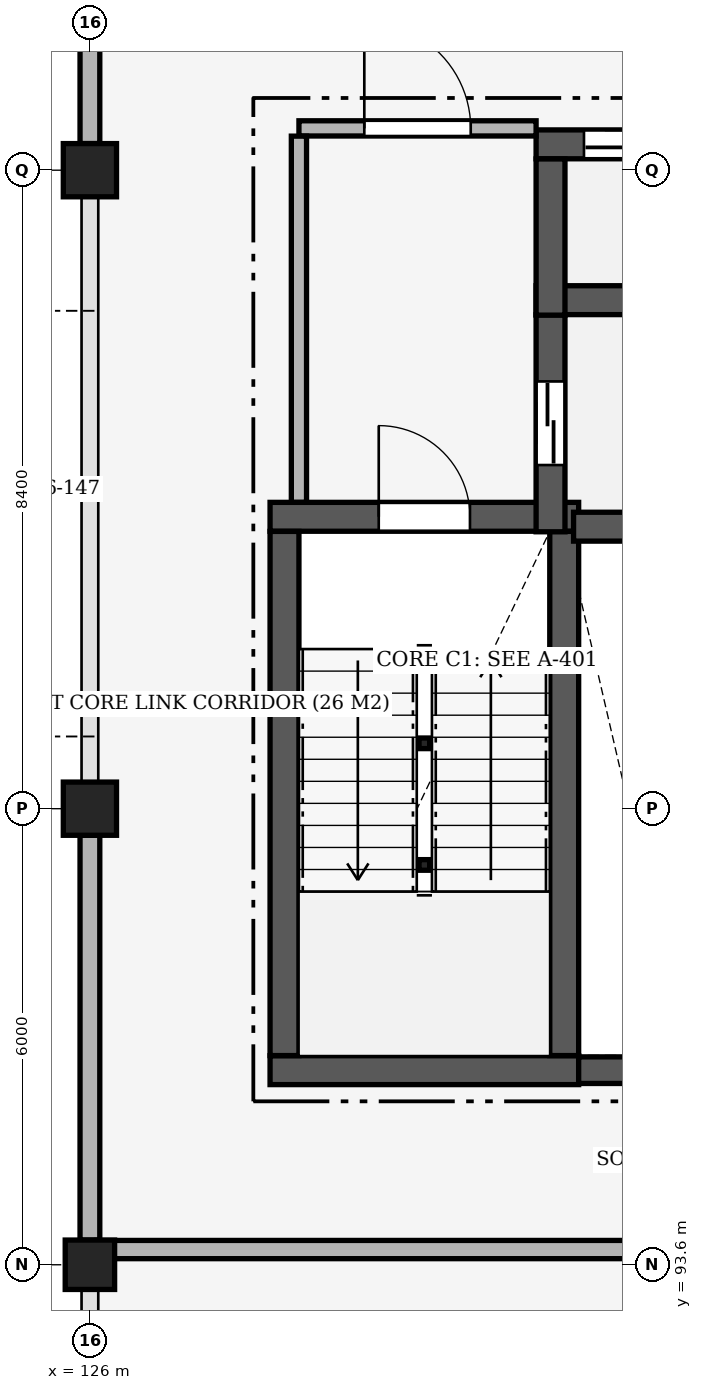
"""IFC4 building model, lengths in metres.
Left out: names, types, materials, properties, quantities, classifications, styles, units other than length and angle.
Written with IfcOpenShell. Run it as: python <this file> out.ifc"""

import sys

from ifc_helpers import new_model, si_unit, direction, frame, frame_2d, origin, origin_2d, place, context, subcontext, project, spatial, rectangle, hollow_circle, extrude, element, fill, save


model = new_model("IFC4")
c1 = context("Model", 3, precision=1e-05, world=origin(), true_north=direction((0.0, 1.0)))
c2 = subcontext(c1, "Body", "Model", "MODEL_VIEW")
j1 = project(units=[si_unit("LENGTHUNIT", "METRE"), si_unit("PLANEANGLEUNIT", "RADIAN")], contexts=[c1])
p1 = place(None, origin())
s1 = spatial("IfcSite", under=j1, at=p1, CompositionType="ELEMENT")
p2 = place(p1, origin())
s2 = spatial("IfcBuilding", under=s1, at=p2, CompositionType="ELEMENT")
p3 = place(p2, frame((0.0, 0.0, 29.4)))
s3 = spatial("IfcBuildingStorey", under=s2, at=p3, CompositionType="ELEMENT", Elevation=29.4)
p4 = place(p3, frame((126.0, 93.6, 0.0), z_axis=(0.0, 0.0, 1.0), x_axis=(1.0, 0.0, 0.0)))
e1 = element("IfcColumn", 1, at=p4, inside=s3, PredefinedType="COLUMN", context=c2, shape_type="SweptSolid", body=[
    extrude(rectangle(XDim=0.65, YDim=0.65, at=origin_2d()), origin(), (0.0, 0.0, 1.0), 4.2),
])
for number, where, z_axis, x_axis in (
    (2, (126.0, 99.6, 0.0), (0.0, 0.0, 1.0), (1.0, 0.0, 0.0)),
    (3, (126.0, 108.0, 0.0), (0.0, 0.0, 1.0), (1.0, 0.0, 0.0)),
):
    element("IfcColumn", number, at=place(p3, frame(where, z_axis=z_axis, x_axis=x_axis)), inside=s3, PredefinedType="COLUMN", context=c2, shape_type="SweptSolid", body=[
        extrude(rectangle(XDim=0.7, YDim=0.7, at=origin_2d()), origin(), (0.0, 0.0, 1.0), 4.2),
    ])
for number, where, z_axis, x_axis in (
    (4, (130.4, 98.86, -2.53), (0.0, 0.0, 1.0), (1.0, 0.0, 0.0)),
    (5, (130.4, 100.46, -2.53), (0.0, 0.0, 1.0), (1.0, 0.0, 0.0)),
):
    element("IfcColumn", number, at=place(p3, frame(where, z_axis=z_axis, x_axis=x_axis)), inside=s3, PredefinedType="COLUMN", context=c2, shape_type="SweptSolid", body=[
        extrude(hollow_circle(Radius=0.07, WallThickness=0.008, at=origin_2d()), origin(), (0.0, 0.0, 1.0), 4.2),
    ])
p5 = place(p3, frame((126.0, 93.925, 0.0), z_axis=(0.0, 0.0, 1.0), x_axis=(0.0, 1.0, 0.0)))
e6 = element("IfcWall", 6, at=p5, inside=s3, PredefinedType="SOLIDWALL", context=c2, shape_type="SweptSolid", body=[
    extrude(rectangle(XDim=5.325, YDim=0.26, at=frame_2d((2.663, 0.0))), origin(), (0.0, 0.0, 1.0), 3.4),
])
p6 = place(p3, frame((126.0, 108.35, 0.0), z_axis=(0.0, 0.0, 1.0), x_axis=(0.0, 1.0, 0.0)))
e7 = element("IfcWall", 7, at=p6, inside=s3, PredefinedType="SOLIDWALL", context=c2, shape_type="SweptSolid", body=[
    extrude(rectangle(XDim=4.7, YDim=0.26, at=frame_2d((2.35, 0.0))), origin(), (0.0, 0.0, 1.0), 3.4),
])
p7 = place(p3, frame((128.37, 103.44, 0.0), z_axis=(0.0, 0.0, 1.0), x_axis=(1.0, 0.0, 0.0)))
e8 = element("IfcWall", 8, at=p7, inside=s3, PredefinedType="SHEAR", context=c2, shape_type="SweptSolid", body=[
    extrude(rectangle(XDim=4.06, YDim=0.38, at=frame_2d((2.03, 0.0))), origin(), (0.0, 0.0, 1.0), 3.95),
])
p8 = place(p7, frame((1.43, 0.0, 0.0)))
e9 = element("IfcOpeningElement", 9, at=p8, cuts=e8, PredefinedType="OPENING", context=c2, shape_type="SweptSolid", body=[
    extrude(rectangle(XDim=1.2, YDim=2.2, at=frame_2d((0.6, 1.1))), frame((0.0, 0.205, 0.0), z_axis=(0.0, -1.0, 0.0), x_axis=(1.0, 0.0, 0.0)), (0.0, 0.0, 1.0), 0.41),
])
p9 = place(p3, frame((128.37, 96.16, 0.0), z_axis=(0.0, 0.0, 1.0), x_axis=(1.0, 0.0, 0.0)))
e10 = element("IfcWall", 10, at=p9, inside=s3, PredefinedType="SHEAR", context=c2, shape_type="SweptSolid", body=[
    extrude(rectangle(XDim=4.06, YDim=0.38, at=frame_2d((2.03, 0.0))), origin(), (0.0, 0.0, 1.0), 3.95),
])
for number, where, z_axis, x_axis in (
    (11, (128.56, 96.352, 0.0), (0.0, 0.0, 1.0), (0.0, 1.0, 0.0)),
    (12, (132.24, 96.352, 0.0), (0.0, 0.0, 1.0), (0.0, 1.0, 0.0)),
):
    element("IfcWall", number, at=place(p3, frame(where, z_axis=z_axis, x_axis=x_axis)), inside=s3, PredefinedType="SHEAR", context=c2, shape_type="SweptSolid", body=[
        extrude(rectangle(XDim=6.896, YDim=0.38, at=frame_2d((3.448, 0.0))), origin(), (0.0, 0.0, 1.0), 3.95),
    ])
p10 = place(p3, frame((132.363, 103.31, 0.0), z_axis=(0.0, 0.0, 1.0), x_axis=(1.0, 0.0, 0.0)))
e13 = element("IfcWall", 13, at=p10, inside=s3, PredefinedType="SHEAR", context=c2, shape_type="SweptSolid", body=[
    extrude(rectangle(XDim=1.867, YDim=0.38, at=frame_2d((0.934, 0.0))), origin(), (0.0, 0.0, 1.0), 3.95),
])
p11 = place(p3, frame((131.87, 106.29, 0.0), z_axis=(0.0, 0.0, 1.0), x_axis=(1.0, 0.0, 0.0)))
e14 = element("IfcWall", 14, at=p11, inside=s3, PredefinedType="SHEAR", context=c2, shape_type="SweptSolid", body=[
    extrude(rectangle(XDim=2.36, YDim=0.38, at=frame_2d((1.18, 0.0))), origin(), (0.0, 0.0, 1.0), 3.95),
])
p12 = place(p3, frame((132.06, 103.243, 0.0), z_axis=(0.0, 0.0, 1.0), x_axis=(0.0, 1.0, 0.0)))
e15 = element("IfcWall", 15, at=p12, inside=s3, PredefinedType="SHEAR", context=c2, shape_type="SweptSolid", body=[
    extrude(rectangle(XDim=2.855, YDim=0.38, at=frame_2d((1.427, 0.0))), origin(), (0.0, 0.0, 1.0), 3.95),
])
p13 = place(p12, frame((0.878, 0.0, 0.0)))
e16 = element("IfcOpeningElement", 16, at=p13, cuts=e15, PredefinedType="OPENING", context=c2, shape_type="SweptSolid", body=[
    extrude(rectangle(XDim=1.1, YDim=2.15, at=frame_2d((0.55, 1.075))), frame((0.0, 0.205, 0.0), z_axis=(0.0, -1.0, 0.0), x_axis=(1.0, 0.0, 0.0)), (0.0, 0.0, 1.0), 0.41),
])
p14 = place(p3, frame((131.87, 108.34, 0.0), z_axis=(0.0, 0.0, 1.0), x_axis=(1.0, 0.0, 0.0)))
e17 = element("IfcWall", 17, at=p14, inside=s3, PredefinedType="SHEAR", context=c2, shape_type="SweptSolid", body=[
    extrude(rectangle(XDim=2.36, YDim=0.38, at=frame_2d((1.18, 0.0))), origin(), (0.0, 0.0, 1.0), 3.95),
])
p15 = place(p14, frame((0.63, 0.0, 0.0)))
e18 = element("IfcOpeningElement", 18, at=p15, cuts=e17, PredefinedType="OPENING", context=c2, shape_type="SweptSolid", body=[
    extrude(rectangle(XDim=1.1, YDim=2.15, at=frame_2d((0.55, 1.075))), frame((0.0, 0.205, 0.0), z_axis=(0.0, -1.0, 0.0), x_axis=(1.0, 0.0, 0.0)), (0.0, 0.0, 1.0), 0.41),
])
p16 = place(p3, frame((132.06, 106.093, 0.0), z_axis=(0.0, 0.0, 1.0), x_axis=(0.0, 1.0, 0.0)))
e19 = element("IfcWall", 19, at=p16, inside=s3, PredefinedType="SHEAR", context=c2, shape_type="SweptSolid", body=[
    extrude(rectangle(XDim=2.055, YDim=0.38, at=frame_2d((1.027, 0.0))), origin(), (0.0, 0.0, 1.0), 3.95),
])
p17 = place(p3, frame((132.43, 96.16, 0.0), z_axis=(0.0, 0.0, 1.0), x_axis=(1.0, 0.0, 0.0)))
e20 = element("IfcWall", 20, at=p17, inside=s3, PredefinedType="SHEAR", context=c2, shape_type="SweptSolid", body=[
    extrude(rectangle(XDim=1.8, YDim=0.35, at=frame_2d((0.9, 0.0))), origin(), (0.0, 0.0, 1.0), 3.95),
])
p18 = place(p3, frame((126.089, 93.8, 0.0), z_axis=(0.0, 0.0, 1.0), x_axis=(1.0, 0.0, 0.0)))
e21 = element("IfcWall", 21, at=p18, inside=s3, PredefinedType="PARTITIONING", context=c2, shape_type="SweptSolid", body=[
    extrude(rectangle(XDim=14.111, YDim=0.24, at=frame_2d((7.055, 0.0))), origin(), (0.0, 0.0, 1.0), 3.25),
])
p19 = place(p3, frame((128.75, 108.55, 0.0), z_axis=(0.0, 0.0, 1.0), x_axis=(1.0, 0.0, 0.0)))
e22 = element("IfcWall", 22, at=p19, inside=s3, PredefinedType="PARTITIONING", context=c2, shape_type="SweptSolid", body=[
    extrude(rectangle(XDim=3.12, YDim=0.2, at=frame_2d((1.56, 0.0))), origin(), (0.0, 0.0, 1.0), 3.95),
])
p20 = place(p19, frame((0.86, 0.0, 0.0)))
e23 = element("IfcOpeningElement", 23, at=p20, cuts=e22, PredefinedType="OPENING", context=c2, shape_type="SweptSolid", body=[
    extrude(rectangle(XDim=1.4, YDim=2.2, at=frame_2d((0.7, 1.1))), frame((0.0, 0.115, 0.0), z_axis=(0.0, -1.0, 0.0), x_axis=(1.0, 0.0, 0.0)), (0.0, 0.0, 1.0), 0.23),
])
p21 = place(p3, frame((128.75, 103.632, 0.0), z_axis=(0.0, 0.0, 1.0), x_axis=(0.0, 1.0, 0.0)))
e24 = element("IfcWall", 24, at=p21, inside=s3, PredefinedType="PARTITIONING", context=c2, shape_type="SweptSolid", body=[
    extrude(rectangle(XDim=4.816, YDim=0.2, at=frame_2d((2.408, 0.0))), origin(), (0.0, 0.0, 1.0), 3.95),
])
p22 = place(p8, origin())
e25 = element("IfcDoor", 25, at=p22, inside=s3, OperationType="SINGLE_SWING_LEFT", PredefinedType="DOOR", context=c2, shape_type="SweptSolid", body=[
    extrude(rectangle(XDim=1.2, YDim=2.2, at=frame_2d((0.6, 1.1))), frame((0.0, 0.025, 0.0), z_axis=(0.0, -1.0, 0.0), x_axis=(1.0, 0.0, 0.0)), (0.0, 0.0, 1.0), 0.05),
])
fill(e9, e25)
p23 = place(p13, origin())
e26 = element("IfcDoor", 26, at=p23, inside=s3, OperationType="DOUBLE_DOOR_SLIDING", PredefinedType="DOOR", context=c2, shape_type="SweptSolid", body=[
    extrude(rectangle(XDim=1.1, YDim=2.15, at=frame_2d((0.55, 1.075))), frame((0.0, 0.025, 0.0), z_axis=(0.0, -1.0, 0.0), x_axis=(1.0, 0.0, 0.0)), (0.0, 0.0, 1.0), 0.05),
])
fill(e16, e26)
p24 = place(p15, origin())
e27 = element("IfcDoor", 27, at=p24, inside=s3, OperationType="DOUBLE_DOOR_SLIDING", PredefinedType="DOOR", context=c2, shape_type="SweptSolid", body=[
    extrude(rectangle(XDim=1.1, YDim=2.15, at=frame_2d((0.55, 1.075))), frame((0.0, 0.025, 0.0), z_axis=(0.0, -1.0, 0.0), x_axis=(1.0, 0.0, 0.0)), (0.0, 0.0, 1.0), 0.05),
])
fill(e18, e27)
p25 = place(p20, origin())
e28 = element("IfcDoor", 28, at=p25, inside=s3, OperationType="SINGLE_SWING_LEFT", PredefinedType="DOOR", context=c2, shape_type="SweptSolid", body=[
    extrude(rectangle(XDim=1.4, YDim=2.2, at=frame_2d((0.7, 1.1))), frame((0.0, 0.025, 0.0), z_axis=(0.0, -1.0, 0.0), x_axis=(1.0, 0.0, 0.0)), (0.0, 0.0, 1.0), 0.05),
])
fill(e23, e28)
save(model, sys.argv[1])
